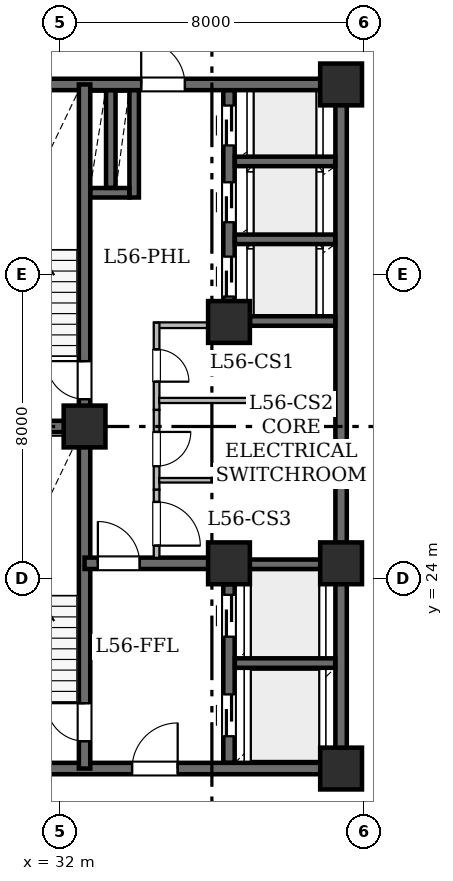
"""IFC4 building model, lengths in metres.
Left out: names, types, materials, properties, quantities, classifications, styles, units other than length and angle.
Written with IfcOpenShell. Run it as: python <this file> out.ifc"""

import sys

from ifc_helpers import new_model, si_unit, direction, frame, frame_2d, origin, origin_2d, place, context, subcontext, project, spatial, rectangle, hollow_rectangle, extrude, element, fill, save


model = new_model("IFC4")
c1 = context("Model", 3, precision=1e-05, world=origin(), true_north=direction((0.0, 1.0)))
c2 = subcontext(c1, "Body", "Model", "MODEL_VIEW")
j1 = project(units=[si_unit("LENGTHUNIT", "METRE"), si_unit("PLANEANGLEUNIT", "RADIAN")], contexts=[c1])
p1 = place(None, origin())
s1 = spatial("IfcSite", under=j1, at=p1, CompositionType="ELEMENT")
p2 = place(p1, origin())
s2 = spatial("IfcBuilding", under=s1, at=p2, CompositionType="ELEMENT")
p3 = place(p2, frame((0.0, 0.0, 220.85)))
s3 = spatial("IfcBuildingStorey", under=s2, at=p3, CompositionType="ELEMENT", Elevation=220.85)
for number, where, z_axis, x_axis in (
    (1, (32.65, 28.0, 0.0), (0.0, 0.0, 1.0), (1.0, 0.0, 0.0)),
    (2, (39.4, 19.0, 0.0), (0.0, 0.0, 1.0), (1.0, 0.0, 0.0)),
    (3, (36.45, 24.4, 0.0), (0.0, 0.0, 1.0), (1.0, 0.0, 0.0)),
    (4, (39.4, 24.4, 0.0), (0.0, 0.0, 1.0), (1.0, 0.0, 0.0)),
    (5, (36.45, 30.75, 0.0), (0.0, 0.0, 1.0), (1.0, 0.0, 0.0)),
    (6, (39.4, 37.0, 0.0), (0.0, 0.0, 1.0), (1.0, 0.0, 0.0)),
):
    element("IfcColumn", number, at=place(p3, frame(where, z_axis=z_axis, x_axis=x_axis)), inside=s3, PredefinedType="COLUMN", context=c2, shape_type="SweptSolid", body=[
        extrude(hollow_rectangle(XDim=1.1, YDim=1.1, WallThickness=0.055, at=origin_2d()), origin(), (0.0, 0.0, 1.0), 3.65),
    ])
p4 = place(p3, frame((29.0, 19.0, 0.0), z_axis=(0.0, 0.0, 1.0), x_axis=(1.0, 0.0, 0.0)))
e7 = element("IfcWall", 7, at=p4, inside=s3, PredefinedType="SHEAR", context=c2, shape_type="SweptSolid", body=[
    extrude(rectangle(XDim=10.4, YDim=0.3, at=frame_2d((5.2, 0.0))), origin(), (0.0, 0.0, 1.0), 3.43),
])
p5 = place(p4, frame((4.9, 0.0, 0.0)))
e8 = element("IfcOpeningElement", 8, at=p5, cuts=e7, PredefinedType="OPENING", context=c2, shape_type="SweptSolid", body=[
    extrude(rectangle(XDim=1.2, YDim=2.15, at=frame_2d((0.6, 1.075))), frame((0.0, 0.16, 0.0), z_axis=(0.0, -1.0, 0.0), x_axis=(1.0, 0.0, 0.0)), (0.0, 0.0, 1.0), 0.32),
])
p6 = place(p3, frame((29.0, 37.0, 0.0), z_axis=(0.0, 0.0, 1.0), x_axis=(1.0, 0.0, 0.0)))
e9 = element("IfcWall", 9, at=p6, inside=s3, PredefinedType="SHEAR", context=c2, shape_type="SweptSolid", body=[
    extrude(rectangle(XDim=10.4, YDim=0.3, at=frame_2d((5.2, 0.0))), origin(), (0.0, 0.0, 1.0), 3.43),
])
p7 = place(p6, frame((5.14, 0.0, 0.0)))
e10 = element("IfcOpeningElement", 10, at=p7, cuts=e9, PredefinedType="OPENING", context=c2, shape_type="SweptSolid", body=[
    extrude(rectangle(XDim=1.15, YDim=2.2, at=frame_2d((0.575, 1.1))), frame((0.0, 0.16, 0.0), z_axis=(0.0, -1.0, 0.0), x_axis=(1.0, 0.0, 0.0)), (0.0, 0.0, 1.0), 0.32),
])
p8 = place(p3, frame((39.4, 19.0, 0.0), z_axis=(0.0, 0.0, 1.0), x_axis=(0.0, 1.0, 0.0)))
e11 = element("IfcWall", 11, at=p8, inside=s3, PredefinedType="SHEAR", context=c2, shape_type="SweptSolid", body=[
    extrude(rectangle(XDim=5.4, YDim=0.3, at=frame_2d((2.7, 0.0))), origin(), (0.0, 0.0, 1.0), 3.43),
])
p9 = place(p3, frame((39.4, 24.4, 0.0), z_axis=(0.0, 0.0, 1.0), x_axis=(0.0, 1.0, 0.0)))
e12 = element("IfcWall", 12, at=p9, inside=s3, PredefinedType="SHEAR", context=c2, shape_type="SweptSolid", body=[
    extrude(rectangle(XDim=12.6, YDim=0.3, at=frame_2d((6.3, 0.0))), origin(), (0.0, 0.0, 1.0), 3.43),
])
p10 = place(p3, frame((32.65, 19.0, 0.0), z_axis=(0.0, 0.0, 1.0), x_axis=(0.0, 1.0, 0.0)))
e13 = element("IfcWall", 13, at=p10, inside=s3, PredefinedType="SHEAR", context=c2, shape_type="SweptSolid", body=[
    extrude(rectangle(XDim=9.0, YDim=0.3, at=frame_2d((4.5, 0.0))), origin(), (0.0, 0.0, 1.0), 3.43),
])
p11 = place(p10, frame((0.72, 0.0, 0.0)))
e14 = element("IfcOpeningElement", 14, at=p11, cuts=e13, PredefinedType="OPENING", context=c2, shape_type="SweptSolid", body=[
    extrude(rectangle(XDim=1.0, YDim=2.15, at=frame_2d((0.5, 1.075))), frame((0.0, 0.16, 0.0), z_axis=(0.0, -1.0, 0.0), x_axis=(1.0, 0.0, 0.0)), (0.0, 0.0, 1.0), 0.32),
])
p12 = place(p3, frame((32.65, 28.0, 0.0), z_axis=(0.0, 0.0, 1.0), x_axis=(0.0, 1.0, 0.0)))
e15 = element("IfcWall", 15, at=p12, inside=s3, PredefinedType="SHEAR", context=c2, shape_type="SweptSolid", body=[
    extrude(rectangle(XDim=9.0, YDim=0.3, at=frame_2d((4.5, 0.0))), origin(), (0.0, 0.0, 1.0), 3.43),
])
p13 = place(p12, frame((0.72, 0.0, 0.0)))
e16 = element("IfcOpeningElement", 16, at=p13, cuts=e15, PredefinedType="OPENING", context=c2, shape_type="SweptSolid", body=[
    extrude(rectangle(XDim=1.0, YDim=2.15, at=frame_2d((0.5, 1.075))), frame((0.0, 0.16, 0.0), z_axis=(0.0, -1.0, 0.0), x_axis=(1.0, 0.0, 0.0)), (0.0, 0.0, 1.0), 0.32),
])
p14 = place(p3, frame((29.0, 28.0, 0.0), z_axis=(0.0, 0.0, 1.0), x_axis=(1.0, 0.0, 0.0)))
e17 = element("IfcWall", 17, at=p14, inside=s3, PredefinedType="SHEAR", context=c2, shape_type="SweptSolid", body=[
    extrude(rectangle(XDim=3.65, YDim=0.3, at=frame_2d((1.825, 0.0))), origin(), (0.0, 0.0, 1.0), 3.43),
])
p15 = place(p3, frame((32.65, 24.4, 0.0), z_axis=(0.0, 0.0, 1.0), x_axis=(1.0, 0.0, 0.0)))
e18 = element("IfcWall", 18, at=p15, inside=s3, PredefinedType="SHEAR", context=c2, shape_type="SweptSolid", body=[
    extrude(rectangle(XDim=3.8, YDim=0.3, at=frame_2d((1.9, 0.0))), origin(), (0.0, 0.0, 1.0), 3.43),
])
p16 = place(p15, frame((0.35, 0.0, 0.0)))
e19 = element("IfcOpeningElement", 19, at=p16, cuts=e18, PredefinedType="OPENING", context=c2, shape_type="SweptSolid", body=[
    extrude(rectangle(XDim=1.1, YDim=2.15, at=frame_2d((0.55, 1.075))), frame((0.0, 0.16, 0.0), z_axis=(0.0, -1.0, 0.0), x_axis=(1.0, 0.0, 0.0)), (0.0, 0.0, 1.0), 0.32),
])
p17 = place(p3, frame((36.45, 19.154, 0.0), z_axis=(0.0, 0.0, 1.0), x_axis=(0.0, 1.0, 0.0)))
e20 = element("IfcWall", 20, at=p17, inside=s3, PredefinedType="SHEAR", context=c2, shape_type="SweptSolid", body=[
    extrude(rectangle(XDim=4.696, YDim=0.3, at=frame_2d((2.348, 0.0))), origin(), (0.0, 0.0, 1.0), 3.43),
])
p18 = place(p17, frame((0.696, 0.0, 0.0)))
e21 = element("IfcOpeningElement", 21, at=p18, cuts=e20, PredefinedType="OPENING", context=c2, shape_type="SweptSolid", body=[
    extrude(rectangle(XDim=1.1, YDim=2.15, at=frame_2d((0.55, 1.075))), frame((0.0, 0.16, 0.0), z_axis=(0.0, -1.0, 0.0), x_axis=(1.0, 0.0, 0.0)), (0.0, 0.0, 1.0), 0.32),
])
p19 = place(p17, frame((3.316, 0.0, 0.0)))
e22 = element("IfcOpeningElement", 22, at=p19, cuts=e20, PredefinedType="OPENING", context=c2, shape_type="SweptSolid", body=[
    extrude(rectangle(XDim=1.1, YDim=2.15, at=frame_2d((0.55, 1.075))), frame((0.0, 0.16, 0.0), z_axis=(0.0, -1.0, 0.0), x_axis=(1.0, 0.0, 0.0)), (0.0, 0.0, 1.0), 0.32),
])
p20 = place(p3, frame((36.45, 31.3, 0.0), z_axis=(0.0, 0.0, 1.0), x_axis=(0.0, 1.0, 0.0)))
e23 = element("IfcWall", 23, at=p20, inside=s3, PredefinedType="SHEAR", context=c2, shape_type="SweptSolid", body=[
    extrude(rectangle(XDim=5.546, YDim=0.3, at=frame_2d((2.773, 0.0))), origin(), (0.0, 0.0, 1.0), 3.43),
])
p21 = place(p20, frame((0.12, 0.0, 0.0)))
e24 = element("IfcOpeningElement", 24, at=p21, cuts=e23, PredefinedType="OPENING", context=c2, shape_type="SweptSolid", body=[
    extrude(rectangle(XDim=1.05, YDim=2.15, at=frame_2d((0.525, 1.075))), frame((0.0, 0.16, 0.0), z_axis=(0.0, -1.0, 0.0), x_axis=(1.0, 0.0, 0.0)), (0.0, 0.0, 1.0), 0.32),
])
p22 = place(p20, frame((2.075, 0.0, 0.0)))
e25 = element("IfcOpeningElement", 25, at=p22, cuts=e23, PredefinedType="OPENING", context=c2, shape_type="SweptSolid", body=[
    extrude(rectangle(XDim=1.05, YDim=2.15, at=frame_2d((0.525, 1.075))), frame((0.0, 0.16, 0.0), z_axis=(0.0, -1.0, 0.0), x_axis=(1.0, 0.0, 0.0)), (0.0, 0.0, 1.0), 0.32),
])
p23 = place(p20, frame((4.095, 0.0, 0.0)))
e26 = element("IfcOpeningElement", 26, at=p23, cuts=e23, PredefinedType="OPENING", context=c2, shape_type="SweptSolid", body=[
    extrude(rectangle(XDim=1.05, YDim=2.15, at=frame_2d((0.525, 1.075))), frame((0.0, 0.16, 0.0), z_axis=(0.0, -1.0, 0.0), x_axis=(1.0, 0.0, 0.0)), (0.0, 0.0, 1.0), 0.32),
])
for number, where, z_axis, x_axis in (
    (27, (36.604, 21.775, 0.0), (0.0, 0.0, 1.0), (1.0, 0.0, 0.0)),
    (28, (36.604, 24.375, 0.0), (0.0, 0.0, 1.0), (1.0, 0.0, 0.0)),
):
    element("IfcWall", number, at=place(p3, frame(where, z_axis=z_axis, x_axis=x_axis)), inside=s3, PredefinedType="SHEAR", context=c2, shape_type="SweptSolid", body=[
        extrude(rectangle(XDim=2.642, YDim=0.25, at=frame_2d((1.321, 0.0))), origin(), (0.0, 0.0, 1.0), 3.43),
    ])
p24 = place(p3, frame((37.004, 30.775, 0.0), z_axis=(0.0, 0.0, 1.0), x_axis=(1.0, 0.0, 0.0)))
e29 = element("IfcWall", 29, at=p24, inside=s3, PredefinedType="SHEAR", context=c2, shape_type="SweptSolid", body=[
    extrude(rectangle(XDim=2.242, YDim=0.25, at=frame_2d((1.121, 0.0))), origin(), (0.0, 0.0, 1.0), 3.43),
])
for number, where, z_axis, x_axis in (
    (30, (36.604, 32.925, 0.0), (0.0, 0.0, 1.0), (1.0, 0.0, 0.0)),
    (31, (36.604, 34.975, 0.0), (0.0, 0.0, 1.0), (1.0, 0.0, 0.0)),
):
    element("IfcWall", number, at=place(p3, frame(where, z_axis=z_axis, x_axis=x_axis)), inside=s3, PredefinedType="SHEAR", context=c2, shape_type="SweptSolid", body=[
        extrude(rectangle(XDim=2.642, YDim=0.25, at=frame_2d((1.321, 0.0))), origin(), (0.0, 0.0, 1.0), 3.43),
    ])
p25 = place(p3, frame((33.955, 34.025, 0.0), z_axis=(0.0, 0.0, 1.0), x_axis=(0.0, 1.0, 0.0)))
e32 = element("IfcWall", 32, at=p25, inside=s3, PredefinedType="SHEAR", context=c2, shape_type="SweptSolid", body=[
    extrude(rectangle(XDim=2.821, YDim=0.25, at=frame_2d((1.411, 0.0))), origin(), (0.0, 0.0, 1.0), 3.43),
])
p26 = place(p3, frame((32.804, 34.15, 0.0), z_axis=(0.0, 0.0, 1.0), x_axis=(1.0, 0.0, 0.0)))
e33 = element("IfcWall", 33, at=p26, inside=s3, PredefinedType="SHEAR", context=c2, shape_type="SweptSolid", body=[
    extrude(rectangle(XDim=1.022, YDim=0.25, at=frame_2d((0.511, 0.0))), origin(), (0.0, 0.0, 1.0), 3.43),
])
p27 = place(p3, frame((33.34, 34.279, 0.0), z_axis=(0.0, 0.0, 1.0), x_axis=(0.0, 1.0, 0.0)))
e34 = element("IfcWall", 34, at=p27, inside=s3, PredefinedType="SHEAR", context=c2, shape_type="SweptSolid", body=[
    extrude(rectangle(XDim=2.567, YDim=0.25, at=frame_2d((1.283, 0.0))), origin(), (0.0, 0.0, 1.0), 3.43),
])
p28 = place(p3, frame((36.3, 30.665, 0.0), z_axis=(0.0, 0.0, 1.0), x_axis=(-1.0, 0.0, 0.0)))
e35 = element("IfcWall", 35, at=p28, inside=s3, PredefinedType="STANDARD", context=c2, shape_type="SweptSolid", body=[
    extrude(rectangle(XDim=1.82, YDim=0.15, at=frame_2d((0.91, 0.0))), origin(), (0.0, 0.0, 1.0), 3.43),
])
p29 = place(p3, frame((34.545, 30.73, 0.0), z_axis=(0.0, 0.0, 1.0), x_axis=(0.0, -1.0, 0.0)))
e36 = element("IfcWall", 36, at=p29, inside=s3, PredefinedType="STANDARD", context=c2, shape_type="SweptSolid", body=[
    extrude(rectangle(XDim=2.294, YDim=0.15, at=frame_2d((1.147, 0.0))), origin(), (0.0, 0.0, 1.0), 3.43),
])
p30 = place(p29, frame((0.701, 0.0, 0.0)))
e37 = element("IfcOpeningElement", 37, at=p30, cuts=e36, PredefinedType="OPENING", context=c2, shape_type="SweptSolid", body=[
    extrude(rectangle(XDim=0.85, YDim=2.1, at=frame_2d((0.425, 1.05))), frame((0.0, 0.085, 0.0), z_axis=(0.0, -1.0, 0.0), x_axis=(1.0, 0.0, 0.0)), (0.0, 0.0, 1.0), 0.17),
])
p31 = place(p3, frame((34.545, 28.436, 0.0), z_axis=(0.0, 0.0, 1.0), x_axis=(0.0, -1.0, 0.0)))
e38 = element("IfcWall", 38, at=p31, inside=s3, PredefinedType="STANDARD", context=c2, shape_type="SweptSolid", body=[
    extrude(rectangle(XDim=2.1, YDim=0.15, at=frame_2d((1.05, 0.0))), origin(), (0.0, 0.0, 1.0), 3.43),
])
p32 = place(p31, frame((0.579, 0.0, 0.0)))
e39 = element("IfcOpeningElement", 39, at=p32, cuts=e38, PredefinedType="OPENING", context=c2, shape_type="SweptSolid", body=[
    extrude(rectangle(XDim=0.9, YDim=2.1, at=frame_2d((0.45, 1.05))), frame((0.0, 0.085, 0.0), z_axis=(0.0, -1.0, 0.0), x_axis=(1.0, 0.0, 0.0)), (0.0, 0.0, 1.0), 0.17),
])
p33 = place(p3, frame((34.545, 26.336, 0.0), z_axis=(0.0, 0.0, 1.0), x_axis=(0.0, -1.0, 0.0)))
e40 = element("IfcWall", 40, at=p33, inside=s3, PredefinedType="STANDARD", context=c2, shape_type="SweptSolid", body=[
    extrude(rectangle(XDim=1.792, YDim=0.15, at=frame_2d((0.896, 0.0))), origin(), (0.0, 0.0, 1.0), 3.43),
])
p34 = place(p33, frame((0.321, 0.0, 0.0)))
e41 = element("IfcOpeningElement", 41, at=p34, cuts=e40, PredefinedType="OPENING", context=c2, shape_type="SweptSolid", body=[
    extrude(rectangle(XDim=1.15, YDim=2.2, at=frame_2d((0.575, 1.1))), frame((0.0, 0.085, 0.0), z_axis=(0.0, -1.0, 0.0), x_axis=(1.0, 0.0, 0.0)), (0.0, 0.0, 1.0), 0.17),
])
p35 = place(p3, frame((39.256, 28.685, 0.0), z_axis=(0.0, 0.0, 1.0), x_axis=(-1.0, 0.0, 0.0)))
e42 = element("IfcWall", 42, at=p35, inside=s3, PredefinedType="PARTITIONING", context=c2, shape_type="SweptSolid", body=[
    extrude(rectangle(XDim=4.644, YDim=0.135, at=frame_2d((2.322, 0.0))), origin(), (0.0, 0.0, 1.0), 3.43),
])
p36 = place(p3, frame((39.256, 26.585, 0.0), z_axis=(0.0, 0.0, 1.0), x_axis=(-1.0, 0.0, 0.0)))
e43 = element("IfcWall", 43, at=p36, inside=s3, PredefinedType="PARTITIONING", context=c2, shape_type="SweptSolid", body=[
    extrude(rectangle(XDim=4.644, YDim=0.12, at=frame_2d((2.322, 0.0))), origin(), (0.0, 0.0, 1.0), 3.43),
])
p37 = place(p11, origin())
e44 = element("IfcDoor", 44, at=p37, inside=s3, OperationType="SINGLE_SWING_RIGHT", PredefinedType="DOOR", context=c2, shape_type="SweptSolid", body=[
    extrude(rectangle(XDim=1.0, YDim=2.15, at=frame_2d((0.5, 1.075))), frame((0.0, 0.025, 0.0), z_axis=(0.0, -1.0, 0.0), x_axis=(1.0, 0.0, 0.0)), (0.0, 0.0, 1.0), 0.05),
])
fill(e14, e44)
p38 = place(p13, origin())
e45 = element("IfcDoor", 45, at=p38, inside=s3, OperationType="SINGLE_SWING_RIGHT", PredefinedType="DOOR", context=c2, shape_type="SweptSolid", body=[
    extrude(rectangle(XDim=1.0, YDim=2.15, at=frame_2d((0.5, 1.075))), frame((0.0, 0.025, 0.0), z_axis=(0.0, -1.0, 0.0), x_axis=(1.0, 0.0, 0.0)), (0.0, 0.0, 1.0), 0.05),
])
fill(e16, e45)
p39 = place(p16, origin())
e46 = element("IfcDoor", 46, at=p39, inside=s3, OperationType="SINGLE_SWING_LEFT", PredefinedType="DOOR", context=c2, shape_type="SweptSolid", body=[
    extrude(rectangle(XDim=1.1, YDim=2.15, at=frame_2d((0.55, 1.075))), frame((0.0, 0.025, 0.0), z_axis=(0.0, -1.0, 0.0), x_axis=(1.0, 0.0, 0.0)), (0.0, 0.0, 1.0), 0.05),
])
fill(e19, e46)
p40 = place(p5, origin())
e47 = element("IfcDoor", 47, at=p40, inside=s3, OperationType="SINGLE_SWING_RIGHT", PredefinedType="DOOR", context=c2, shape_type="SweptSolid", body=[
    extrude(rectangle(XDim=1.2, YDim=2.15, at=frame_2d((0.6, 1.075))), frame((0.0, 0.025, 0.0), z_axis=(0.0, -1.0, 0.0), x_axis=(1.0, 0.0, 0.0)), (0.0, 0.0, 1.0), 0.05),
])
fill(e8, e47)
p41 = place(p7, origin())
e48 = element("IfcDoor", 48, at=p41, inside=s3, OperationType="SINGLE_SWING_LEFT", PredefinedType="DOOR", context=c2, shape_type="SweptSolid", body=[
    extrude(rectangle(XDim=1.15, YDim=2.2, at=frame_2d((0.575, 1.1))), frame((0.0, 0.025, 0.0), z_axis=(0.0, -1.0, 0.0), x_axis=(1.0, 0.0, 0.0)), (0.0, 0.0, 1.0), 0.05),
])
fill(e10, e48)
p42 = place(p18, origin())
e49 = element("IfcDoor", 49, at=p42, inside=s3, OperationType="SLIDING_TO_LEFT", PredefinedType="DOOR", context=c2, shape_type="SweptSolid", body=[
    extrude(rectangle(XDim=1.1, YDim=2.15, at=frame_2d((0.55, 1.075))), frame((0.0, 0.025, 0.0), z_axis=(0.0, -1.0, 0.0), x_axis=(1.0, 0.0, 0.0)), (0.0, 0.0, 1.0), 0.05),
])
fill(e21, e49)
p43 = place(p19, origin())
e50 = element("IfcDoor", 50, at=p43, inside=s3, OperationType="SLIDING_TO_LEFT", PredefinedType="DOOR", context=c2, shape_type="SweptSolid", body=[
    extrude(rectangle(XDim=1.1, YDim=2.15, at=frame_2d((0.55, 1.075))), frame((0.0, 0.025, 0.0), z_axis=(0.0, -1.0, 0.0), x_axis=(1.0, 0.0, 0.0)), (0.0, 0.0, 1.0), 0.05),
])
fill(e22, e50)
p44 = place(p21, origin())
e51 = element("IfcDoor", 51, at=p44, inside=s3, OperationType="SLIDING_TO_LEFT", PredefinedType="DOOR", context=c2, shape_type="SweptSolid", body=[
    extrude(rectangle(XDim=1.05, YDim=2.15, at=frame_2d((0.525, 1.075))), frame((0.0, 0.025, 0.0), z_axis=(0.0, -1.0, 0.0), x_axis=(1.0, 0.0, 0.0)), (0.0, 0.0, 1.0), 0.05),
])
fill(e24, e51)
p45 = place(p22, origin())
e52 = element("IfcDoor", 52, at=p45, inside=s3, OperationType="SLIDING_TO_LEFT", PredefinedType="DOOR", context=c2, shape_type="SweptSolid", body=[
    extrude(rectangle(XDim=1.05, YDim=2.15, at=frame_2d((0.525, 1.075))), frame((0.0, 0.025, 0.0), z_axis=(0.0, -1.0, 0.0), x_axis=(1.0, 0.0, 0.0)), (0.0, 0.0, 1.0), 0.05),
])
fill(e25, e52)
p46 = place(p23, origin())
e53 = element("IfcDoor", 53, at=p46, inside=s3, OperationType="SLIDING_TO_LEFT", PredefinedType="DOOR", context=c2, shape_type="SweptSolid", body=[
    extrude(rectangle(XDim=1.05, YDim=2.15, at=frame_2d((0.525, 1.075))), frame((0.0, 0.025, 0.0), z_axis=(0.0, -1.0, 0.0), x_axis=(1.0, 0.0, 0.0)), (0.0, 0.0, 1.0), 0.05),
])
fill(e26, e53)
p47 = place(p30, origin())
e54 = element("IfcDoor", 54, at=p47, inside=s3, OperationType="SINGLE_SWING_RIGHT", PredefinedType="DOOR", context=c2, shape_type="SweptSolid", body=[
    extrude(rectangle(XDim=0.85, YDim=2.1, at=frame_2d((0.425, 1.05))), frame((0.0, 0.025, 0.0), z_axis=(0.0, -1.0, 0.0), x_axis=(1.0, 0.0, 0.0)), (0.0, 0.0, 1.0), 0.05),
])
fill(e37, e54)
p48 = place(p32, origin())
e55 = element("IfcDoor", 55, at=p48, inside=s3, OperationType="SINGLE_SWING_LEFT", PredefinedType="DOOR", context=c2, shape_type="SweptSolid", body=[
    extrude(rectangle(XDim=0.9, YDim=2.1, at=frame_2d((0.45, 1.05))), frame((0.0, 0.025, 0.0), z_axis=(0.0, -1.0, 0.0), x_axis=(1.0, 0.0, 0.0)), (0.0, 0.0, 1.0), 0.05),
])
fill(e39, e55)
p49 = place(p34, origin())
e56 = element("IfcDoor", 56, at=p49, inside=s3, OperationType="SINGLE_SWING_RIGHT", PredefinedType="DOOR", context=c2, shape_type="SweptSolid", body=[
    extrude(rectangle(XDim=1.15, YDim=2.2, at=frame_2d((0.575, 1.1))), frame((0.0, 0.025, 0.0), z_axis=(0.0, -1.0, 0.0), x_axis=(1.0, 0.0, 0.0)), (0.0, 0.0, 1.0), 0.05),
])
fill(e41, e56)
save(model, sys.argv[1])
